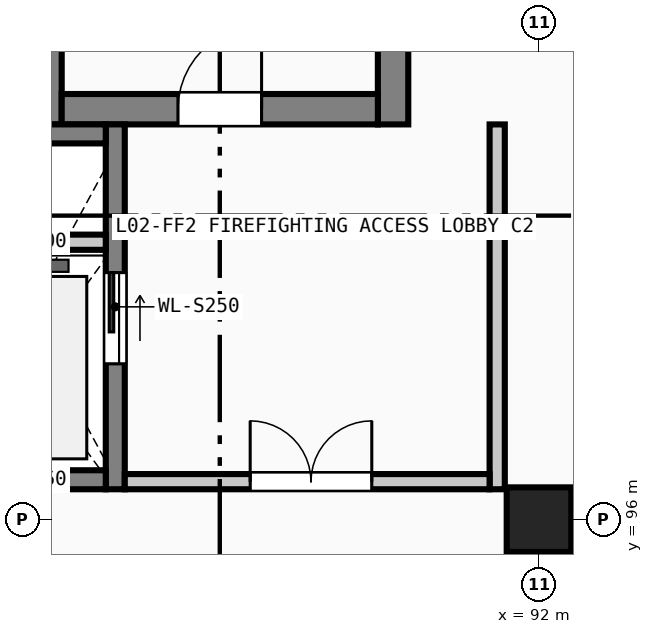
"""IFC4 building model, lengths in metres.
Left out: names, types, materials, properties, quantities, classifications, styles, units other than length and angle.
Written with IfcOpenShell. Run it as: python <this file> out.ifc"""

import sys

from ifc_helpers import new_model, si_unit, direction, frame, frame_2d, origin, origin_2d, place, context, subcontext, project, spatial, rectangle, extrude, element, fill, save


model = new_model("IFC4")
c1 = context("Model", 3, precision=1e-05, world=origin(), true_north=direction((0.0, 1.0)))
c2 = subcontext(c1, "Body", "Model", "MODEL_VIEW")
j1 = project(units=[si_unit("LENGTHUNIT", "METRE"), si_unit("PLANEANGLEUNIT", "RADIAN")], contexts=[c1])
p1 = place(None, origin())
s1 = spatial("IfcSite", under=j1, at=p1, CompositionType="ELEMENT")
p2 = place(p1, origin())
s2 = spatial("IfcBuilding", under=s1, at=p2, CompositionType="ELEMENT")
p3 = place(p2, frame((0.0, 0.0, 9.6)))
s3 = spatial("IfcBuildingStorey", under=s2, at=p3, CompositionType="ELEMENT", Elevation=9.6)
p4 = place(p3, frame((92.0, 96.0, 0.0), z_axis=(0.0, 0.0, 1.0), x_axis=(1.0, 0.0, 0.0)))
e1 = element("IfcColumn", 1, at=p4, inside=s3, PredefinedType="COLUMN", context=c2, shape_type="SweptSolid", body=[
    extrude(rectangle(XDim=0.85, YDim=0.85, at=origin_2d()), origin(), (0.0, 0.0, 1.0), 4.8),
])
for number, where, z_axis, x_axis in (
    (2, (85.52, 101.2, 0.0), (0.0, 0.0, 1.0), (0.0, 1.0, 0.0)),
    (3, (90.08, 110.4, 0.0), (0.0, 0.0, 1.0), (0.0, -1.0, 0.0)),
):
    element("IfcWall", number, at=place(p3, frame(where, z_axis=z_axis, x_axis=x_axis)), inside=s3, PredefinedType="SHEAR", context=c2, shape_type="SweptSolid", body=[
        extrude(rectangle(XDim=9.2, YDim=0.4, at=frame_2d((4.6, 0.0))), origin(), (0.0, 0.0, 1.0), 4.5),
    ])
p5 = place(p3, frame((89.88, 101.4, 0.0), z_axis=(0.0, 0.0, 1.0), x_axis=(-1.0, 0.0, 0.0)))
e4 = element("IfcWall", 4, at=p5, inside=s3, PredefinedType="SHEAR", context=c2, shape_type="SweptSolid", body=[
    extrude(rectangle(XDim=4.16, YDim=0.4, at=frame_2d((2.08, 0.0))), origin(), (0.0, 0.0, 1.0), 4.5),
])
p6 = place(p5, frame((1.53, 0.0, 0.0)))
e5 = element("IfcOpeningElement", 5, at=p6, cuts=e4, PredefinedType="OPENING", context=c2, shape_type="SweptSolid", body=[
    extrude(rectangle(XDim=1.1, YDim=2.2, at=frame_2d((0.55, 1.1))), frame((0.0, 0.21, 0.0), z_axis=(0.0, -1.0, 0.0), x_axis=(1.0, 0.0, 0.0)), (0.0, 0.0, 1.0), 0.42),
])
p7 = place(p3, frame((86.425, 101.2, 0.0), z_axis=(0.0, 0.0, 1.0), x_axis=(0.0, -1.0, 0.0)))
e6 = element("IfcWall", 6, at=p7, inside=s3, PredefinedType="SOLIDWALL", context=c2, shape_type="SweptSolid", body=[
    extrude(rectangle(XDim=4.8, YDim=0.25, at=frame_2d((2.4, 0.0))), origin(), (0.0, 0.0, 1.0), 4.5),
])
p8 = place(p7, frame((1.95, 0.0, 0.0)))
e7 = element("IfcOpeningElement", 7, at=p8, cuts=e6, PredefinedType="OPENING", context=c2, shape_type="SweptSolid", body=[
    extrude(rectangle(XDim=1.2, YDim=2.2, at=frame_2d((0.6, 1.1))), frame((0.0, 0.135, 0.0), z_axis=(0.0, -1.0, 0.0), x_axis=(1.0, 0.0, 0.0)), (0.0, 0.0, 1.0), 0.27),
])
for number, where, z_axis, x_axis in (
    (8, (86.3, 96.525, 0.0), (0.0, 0.0, 1.0), (-1.0, 0.0, 0.0)),
    (9, (84.2, 101.075, 0.0), (0.0, 0.0, 1.0), (1.0, 0.0, 0.0)),
):
    element("IfcWall", number, at=place(p3, frame(where, z_axis=z_axis, x_axis=x_axis)), inside=s3, PredefinedType="SOLIDWALL", context=c2, shape_type="SweptSolid", body=[
        extrude(rectangle(XDim=2.1, YDim=0.25, at=frame_2d((1.05, 0.0))), origin(), (0.0, 0.0, 1.0), 4.5),
    ])
p9 = place(p3, frame((84.2, 99.65, 0.0), z_axis=(0.0, 0.0, 1.0), x_axis=(1.0, 0.0, 0.0)))
e10 = element("IfcWall", 10, at=p9, inside=s3, PredefinedType="SOLIDWALL", context=c2, shape_type="SweptSolid", body=[
    extrude(rectangle(XDim=2.1, YDim=0.2, at=frame_2d((1.05, 0.0))), origin(), (0.0, 0.0, 1.0), 4.5),
])
p10 = place(p3, frame((91.45, 101.2, 0.0), z_axis=(0.0, 0.0, 1.0), x_axis=(0.0, -1.0, 0.0)))
e11 = element("IfcWall", 11, at=p10, inside=s3, PredefinedType="SOLIDWALL", context=c2, shape_type="SweptSolid", body=[
    extrude(rectangle(XDim=4.8, YDim=0.2, at=frame_2d((2.4, 0.0))), origin(), (0.0, 0.0, 1.0), 4.5),
])
p11 = place(p3, frame((91.35, 96.5, 0.0), z_axis=(0.0, 0.0, 1.0), x_axis=(-1.0, 0.0, 0.0)))
e12 = element("IfcWall", 12, at=p11, inside=s3, PredefinedType="SOLIDWALL", context=c2, shape_type="SweptSolid", body=[
    extrude(rectangle(XDim=4.8, YDim=0.2, at=frame_2d((2.4, 0.0))), origin(), (0.0, 0.0, 1.0), 4.5),
])
p12 = place(p11, frame((1.55, 0.0, 0.0)))
e13 = element("IfcOpeningElement", 13, at=p12, cuts=e12, PredefinedType="OPENING", context=c2, shape_type="SweptSolid", body=[
    extrude(rectangle(XDim=1.6, YDim=2.2, at=frame_2d((0.8, 1.1))), frame((0.0, 0.11, 0.0), z_axis=(0.0, -1.0, 0.0), x_axis=(1.0, 0.0, 0.0)), (0.0, 0.0, 1.0), 0.22),
])
p13 = place(p6, frame((1.1, 0.0, 0.0), z_axis=(0.0, 0.0, 1.0), x_axis=(-1.0, 0.0, 0.0)))
e14 = element("IfcDoor", 14, at=p13, inside=s3, OperationType="SINGLE_SWING_RIGHT", PredefinedType="DOOR", context=c2, shape_type="SweptSolid", body=[
    extrude(rectangle(XDim=1.1, YDim=2.2, at=frame_2d((0.55, 1.1))), frame((0.0, 0.025, 0.0), z_axis=(0.0, -1.0, 0.0), x_axis=(1.0, 0.0, 0.0)), (0.0, 0.0, 1.0), 0.05),
])
fill(e5, e14)
p14 = place(p8, origin())
e15 = element("IfcDoor", 15, at=p14, inside=s3, OperationType="SLIDING_TO_LEFT", PredefinedType="DOOR", context=c2, shape_type="SweptSolid", body=[
    extrude(rectangle(XDim=1.2, YDim=2.2, at=frame_2d((0.6, 1.1))), frame((0.0, 0.025, 0.0), z_axis=(0.0, -1.0, 0.0), x_axis=(1.0, 0.0, 0.0)), (0.0, 0.0, 1.0), 0.05),
])
fill(e7, e15)
p15 = place(p12, frame((1.6, 0.0, 0.0), z_axis=(0.0, 0.0, 1.0), x_axis=(-1.0, 0.0, 0.0)))
e16 = element("IfcDoor", 16, at=p15, inside=s3, OperationType="DOUBLE_DOOR_SINGLE_SWING", PredefinedType="DOOR", context=c2, shape_type="SweptSolid", body=[
    extrude(rectangle(XDim=1.6, YDim=2.2, at=frame_2d((0.8, 1.1))), frame((0.0, 0.025, 0.0), z_axis=(0.0, -1.0, 0.0), x_axis=(1.0, 0.0, 0.0)), (0.0, 0.0, 1.0), 0.05),
])
fill(e13, e16)
save(model, sys.argv[1])
